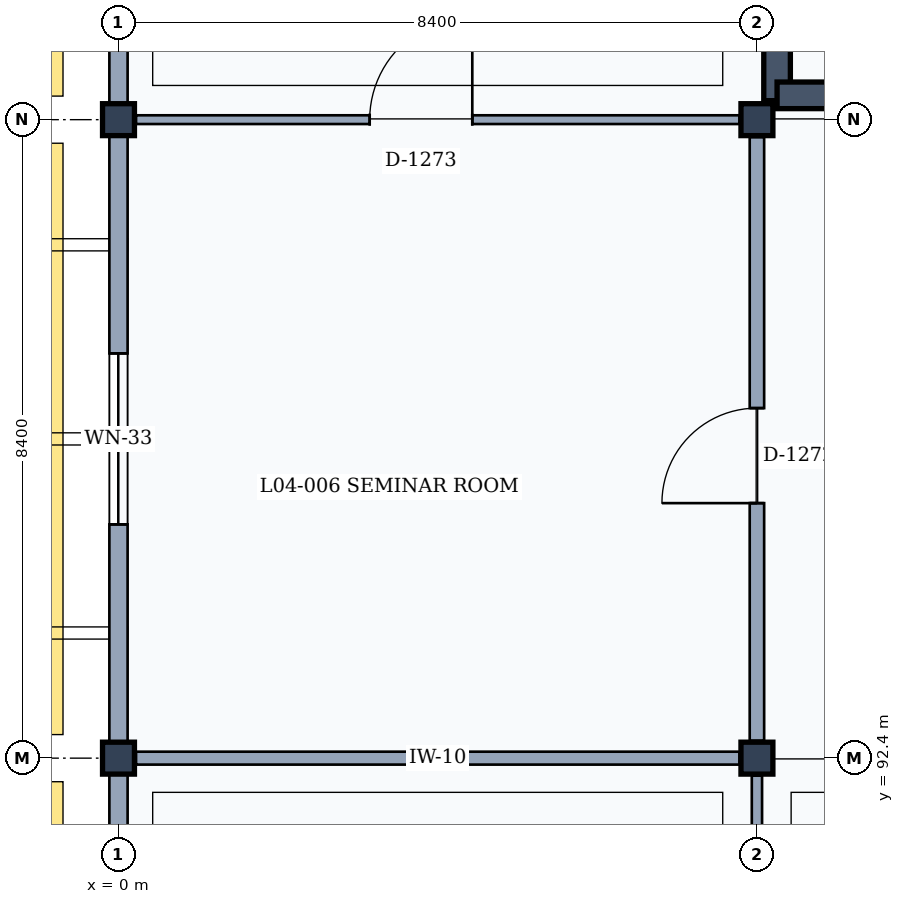
"""IFC4 building model, lengths in metres.
Left out: names, types, materials, properties, quantities, classifications, styles, units other than length and angle.
Written with IfcOpenShell. Run it as: python <this file> out.ifc"""

import sys

from ifc_helpers import new_model, si_unit, direction, frame, frame_2d, origin, origin_2d, place, context, subcontext, project, spatial, rectangle, extrude, element, fill, save


model = new_model("IFC4")
c1 = context("Model", 3, precision=1e-05, world=origin(), true_north=direction((0.0, 1.0)))
c2 = subcontext(c1, "Body", "Model", "MODEL_VIEW")
j1 = project(units=[si_unit("LENGTHUNIT", "METRE"), si_unit("PLANEANGLEUNIT", "RADIAN")], contexts=[c1])
p1 = place(None, origin())
s1 = spatial("IfcSite", under=j1, at=p1, CompositionType="ELEMENT")
p2 = place(p1, origin())
s2 = spatial("IfcBuilding", under=s1, at=p2, CompositionType="ELEMENT")
p3 = place(p2, frame((0.0, 0.0, 18.0)))
s3 = spatial("IfcBuildingStorey", under=s2, at=p3, CompositionType="ELEMENT", Elevation=18.0)
for number, where, z_axis, x_axis in (
    (1, (0.0, 92.4, 0.0), (0.0, 0.0, 1.0), (1.0, 0.0, 0.0)),
    (2, (0.0, 100.8, 0.0), (0.0, 0.0, 1.0), (1.0, 0.0, 0.0)),
    (3, (8.4, 92.4, 0.0), (0.0, 0.0, 1.0), (1.0, 0.0, 0.0)),
    (4, (8.4, 100.8, 0.0), (0.0, 0.0, 1.0), (1.0, 0.0, 0.0)),
):
    element("IfcColumn", number, at=place(p3, frame(where, z_axis=z_axis, x_axis=x_axis)), inside=s3, PredefinedType="COLUMN", context=c2, shape_type="SweptSolid", body=[
        extrude(rectangle(XDim=0.42, YDim=0.42, at=origin_2d()), origin(), (0.0, 0.0, 1.0), 4.2),
    ])
p4 = place(p3, frame((0.0, 84.21, 0.0), z_axis=(0.0, 0.0, 1.0), x_axis=(0.0, 1.0, 0.0)))
e5 = element("IfcWall", 5, at=p4, inside=s3, PredefinedType="SOLIDWALL", context=c2, shape_type="SweptSolid", body=[
    extrude(rectangle(XDim=7.98, YDim=0.24, at=frame_2d((3.99, 0.0))), origin(), (0.0, 0.0, 1.0), 3.36),
])
p5 = place(p4, frame((3.215, 0.0, 0.9)))
e6 = element("IfcOpeningElement", 6, at=p5, cuts=e5, PredefinedType="OPENING", context=c2, shape_type="SweptSolid", body=[
    extrude(rectangle(XDim=1.55, YDim=1.75, at=frame_2d((0.775, 0.875))), frame((0.0, 0.13, 0.0), z_axis=(0.0, -1.0, 0.0), x_axis=(1.0, 0.0, 0.0)), (0.0, 0.0, 1.0), 0.26),
])
p6 = place(p3, frame((0.0, 92.61, 0.0), z_axis=(0.0, 0.0, 1.0), x_axis=(0.0, 1.0, 0.0)))
e7 = element("IfcWall", 7, at=p6, inside=s3, PredefinedType="SOLIDWALL", context=c2, shape_type="SweptSolid", body=[
    extrude(rectangle(XDim=7.98, YDim=0.24, at=frame_2d((3.99, 0.0))), origin(), (0.0, 0.0, 1.0), 3.36),
])
p7 = place(p6, frame((2.865, 0.0, 0.9)))
e8 = element("IfcOpeningElement", 8, at=p7, cuts=e7, PredefinedType="OPENING", context=c2, shape_type="SweptSolid", body=[
    extrude(rectangle(XDim=2.25, YDim=1.6, at=frame_2d((1.125, 0.8))), frame((0.0, 0.13, 0.0), z_axis=(0.0, -1.0, 0.0), x_axis=(1.0, 0.0, 0.0)), (0.0, 0.0, 1.0), 0.26),
])
p8 = place(p3, frame((0.0, 101.01, 0.0), z_axis=(0.0, 0.0, 1.0), x_axis=(0.0, 1.0, 0.0)))
e9 = element("IfcWall", 9, at=p8, inside=s3, PredefinedType="SOLIDWALL", context=c2, shape_type="SweptSolid", body=[
    extrude(rectangle(XDim=7.98, YDim=0.24, at=frame_2d((3.99, 0.0))), origin(), (0.0, 0.0, 1.0), 3.36),
])
p9 = place(p8, frame((2.54, 0.0, 0.9)))
e10 = element("IfcOpeningElement", 10, at=p9, cuts=e9, PredefinedType="OPENING", context=c2, shape_type="SweptSolid", body=[
    extrude(rectangle(XDim=2.9, YDim=1.75, at=frame_2d((1.45, 0.875))), frame((0.0, 0.13, 0.0), z_axis=(0.0, -1.0, 0.0), x_axis=(1.0, 0.0, 0.0)), (0.0, 0.0, 1.0), 0.26),
])
p10 = place(p3, frame((8.665, 101.05, 0.0), z_axis=(0.0, 0.0, 1.0), x_axis=(0.0, 1.0, 0.0)))
e11 = element("IfcWall", 11, at=p10, inside=s3, PredefinedType="SHEAR", context=c2, shape_type="SweptSolid", body=[
    extrude(rectangle(XDim=7.94, YDim=0.35, at=frame_2d((3.97, 0.0))), origin(), (0.0, 0.0, 1.0), 3.98),
])
p11 = place(p3, frame((16.54, 101.12, 0.0), z_axis=(0.0, 0.0, 1.0), x_axis=(-1.0, 0.0, 0.0)))
e12 = element("IfcWall", 12, at=p11, inside=s3, PredefinedType="SHEAR", context=c2, shape_type="SweptSolid", body=[
    extrude(rectangle(XDim=7.875, YDim=0.35, at=frame_2d((3.938, 0.0))), origin(), (0.0, 0.0, 1.0), 3.98),
])
p12 = place(p3, frame((8.4, 84.23, 0.0), z_axis=(0.0, 0.0, 1.0), x_axis=(0.0, 1.0, 0.0)))
e13 = element("IfcWall", 13, at=p12, inside=s3, PredefinedType="PARTITIONING", context=c2, shape_type="SweptSolid", body=[
    extrude(rectangle(XDim=7.94, YDim=0.135, at=frame_2d((3.97, 0.0))), origin(), (0.0, 0.0, 1.0), 3.32),
])
p13 = place(p12, frame((3.3, 0.0, 0.0)))
e14 = element("IfcOpeningElement", 14, at=p13, cuts=e13, PredefinedType="OPENING", context=c2, shape_type="SweptSolid", body=[
    extrude(rectangle(XDim=0.9, YDim=2.1, at=frame_2d((0.45, 1.05))), frame((0.0, 0.077, 0.0), z_axis=(0.0, -1.0, 0.0), x_axis=(1.0, 0.0, 0.0)), (0.0, 0.0, 1.0), 0.155),
])
p14 = place(p3, frame((0.23, 92.4, 0.0), z_axis=(0.0, 0.0, 1.0), x_axis=(1.0, 0.0, 0.0)))
e15 = element("IfcWall", 15, at=p14, inside=s3, PredefinedType="PARTITIONING", context=c2, shape_type="SweptSolid", body=[
    extrude(rectangle(XDim=7.94, YDim=0.17, at=frame_2d((3.97, 0.0))), origin(), (0.0, 0.0, 1.0), 3.32),
])
p15 = place(p3, frame((8.4, 92.63, 0.0), z_axis=(0.0, 0.0, 1.0), x_axis=(0.0, 1.0, 0.0)))
e16 = element("IfcWall", 16, at=p15, inside=s3, PredefinedType="PARTITIONING", context=c2, shape_type="SweptSolid", body=[
    extrude(rectangle(XDim=7.94, YDim=0.19, at=frame_2d((3.97, 0.0))), origin(), (0.0, 0.0, 1.0), 3.32),
])
p16 = place(p15, frame((3.125, 0.0, 0.0)))
e17 = element("IfcOpeningElement", 17, at=p16, cuts=e16, PredefinedType="OPENING", context=c2, shape_type="SweptSolid", body=[
    extrude(rectangle(XDim=1.25, YDim=2.3, at=frame_2d((0.625, 1.15))), frame((0.0, 0.105, 0.0), z_axis=(0.0, -1.0, 0.0), x_axis=(1.0, 0.0, 0.0)), (0.0, 0.0, 1.0), 0.21),
])
p17 = place(p3, frame((0.23, 100.8, 0.0), z_axis=(0.0, 0.0, 1.0), x_axis=(1.0, 0.0, 0.0)))
e18 = element("IfcWall", 18, at=p17, inside=s3, PredefinedType="PARTITIONING", context=c2, shape_type="SweptSolid", body=[
    extrude(rectangle(XDim=7.94, YDim=0.115, at=frame_2d((3.97, 0.0))), origin(), (0.0, 0.0, 1.0), 3.32),
])
p18 = place(p17, frame((3.075, 0.0, 0.0)))
e19 = element("IfcOpeningElement", 19, at=p18, cuts=e18, PredefinedType="OPENING", context=c2, shape_type="SweptSolid", body=[
    extrude(rectangle(XDim=1.35, YDim=2.25, at=frame_2d((0.675, 1.125))), frame((0.0, 0.067, 0.0), z_axis=(0.0, -1.0, 0.0), x_axis=(1.0, 0.0, 0.0)), (0.0, 0.0, 1.0), 0.135),
])
p19 = place(p7, origin())
e20 = element("IfcWindow", 20, at=p19, inside=s3, PartitioningType="SINGLE_PANEL", PredefinedType="WINDOW", context=c2, shape_type="SweptSolid", body=[
    extrude(rectangle(XDim=2.25, YDim=1.6, at=frame_2d((1.125, 0.8))), frame((0.0, 0.03, 0.0), z_axis=(0.0, -1.0, 0.0), x_axis=(1.0, 0.0, 0.0)), (0.0, 0.0, 1.0), 0.06),
])
fill(e8, e20)
p20 = place(p16, origin())
e21 = element("IfcDoor", 21, at=p20, inside=s3, OperationType="SINGLE_SWING_LEFT", PredefinedType="DOOR", context=c2, shape_type="SweptSolid", body=[
    extrude(rectangle(XDim=1.25, YDim=2.3, at=frame_2d((0.625, 1.15))), frame((0.0, 0.025, 0.0), z_axis=(0.0, -1.0, 0.0), x_axis=(1.0, 0.0, 0.0)), (0.0, 0.0, 1.0), 0.05),
])
fill(e17, e21)
p21 = place(p18, origin())
e22 = element("IfcDoor", 22, at=p21, inside=s3, OperationType="SINGLE_SWING_RIGHT", PredefinedType="DOOR", context=c2, shape_type="SweptSolid", body=[
    extrude(rectangle(XDim=1.35, YDim=2.25, at=frame_2d((0.675, 1.125))), frame((0.0, 0.025, 0.0), z_axis=(0.0, -1.0, 0.0), x_axis=(1.0, 0.0, 0.0)), (0.0, 0.0, 1.0), 0.05),
])
fill(e19, e22)
save(model, sys.argv[1])
